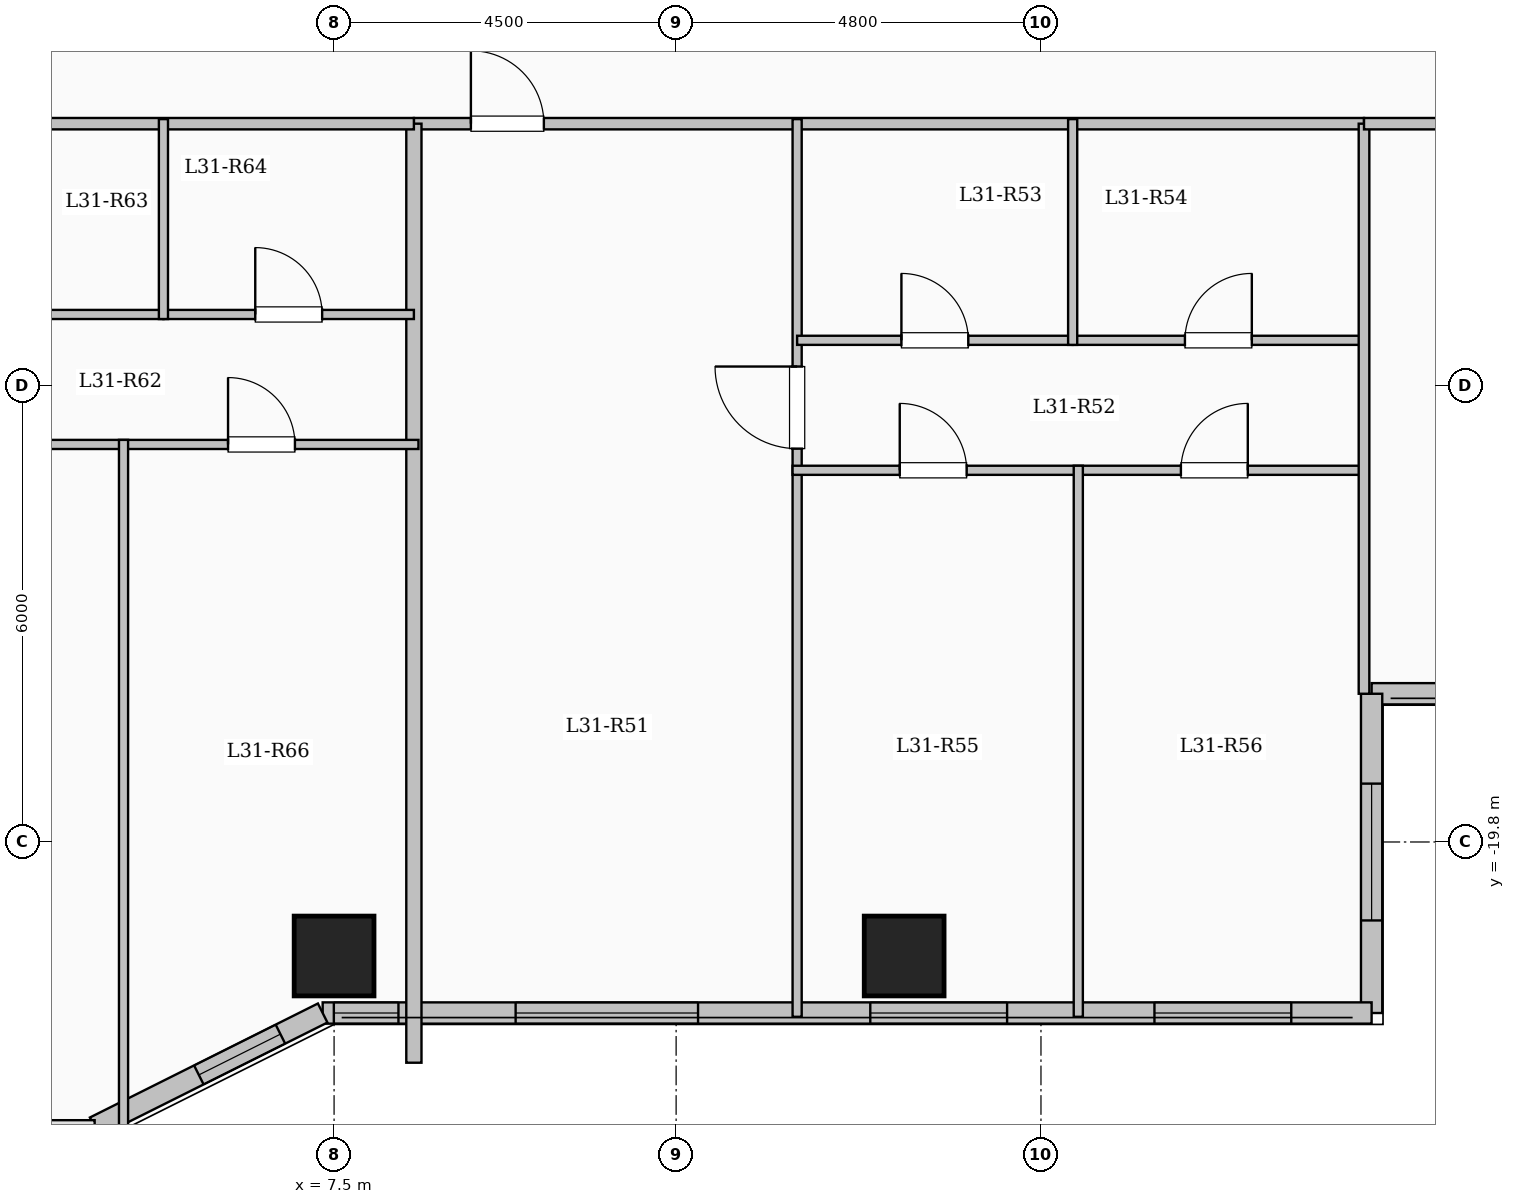
"""IFC4 building model, lengths in metres.
Left out: names, types, materials, properties, quantities, classifications, styles, units other than length and angle.
Written with IfcOpenShell. Run it as: python <this file> out.ifc"""

import sys

from ifc_helpers import new_model, si_unit, direction, frame, frame_2d, origin, origin_2d, place, context, subcontext, project, spatial, rectangle, extrude, element, fill, save


model = new_model("IFC4")
c1 = context("Model", 3, precision=1e-05, world=origin(), true_north=direction((0.0, 1.0)))
c2 = subcontext(c1, "Body", "Model", "MODEL_VIEW")
j1 = project(units=[si_unit("LENGTHUNIT", "METRE"), si_unit("PLANEANGLEUNIT", "RADIAN")], contexts=[c1])
p1 = place(None, origin())
s1 = spatial("IfcSite", under=j1, at=p1, CompositionType="ELEMENT")
p2 = place(p1, origin())
s2 = spatial("IfcBuilding", under=s1, at=p2, CompositionType="ELEMENT")
p3 = place(p2, frame((0.0, 0.0, 115.15)))
s3 = spatial("IfcBuildingStorey", under=s2, at=p3, CompositionType="ELEMENT", Elevation=115.15)
for number, where, z_axis, x_axis in (
    (1, (7.5, -21.3, 0.0), (0.0, 0.0, 1.0), (1.0, 0.0, 0.0)),
    (2, (15.0, -21.3, 0.0), (0.0, 0.0, 1.0), (1.0, 0.0, 0.0)),
):
    element("IfcColumn", number, at=place(p3, frame(where, z_axis=z_axis, x_axis=x_axis)), inside=s3, PredefinedType="COLUMN", context=c2, shape_type="SweptSolid", body=[
        extrude(rectangle(XDim=1.05, YDim=1.05, at=origin_2d()), origin(), (0.0, 0.0, 1.0), 3.35),
    ])
p4 = place(p3, frame((26.85, -17.85, 0.0), z_axis=(0.0, 0.0, 1.0), x_axis=(-1.0, 0.0, 0.0)))
e3 = element("IfcWall", 3, at=p4, inside=s3, PredefinedType="SOLIDWALL", context=c2, shape_type="SweptSolid", body=[
    extrude(rectangle(XDim=5.7, YDim=0.28, at=frame_2d((2.85, 0.0))), origin(), (0.0, 0.0, 1.0), 3.05),
])
p5 = place(p4, frame((1.675, 0.0, 0.9)))
e4 = element("IfcOpeningElement", 4, at=p5, cuts=e3, PredefinedType="OPENING", context=c2, shape_type="SweptSolid", body=[
    extrude(rectangle(XDim=2.4, YDim=1.8, at=frame_2d((1.2, 0.9))), frame((0.0, 0.15, 0.0), z_axis=(0.0, -1.0, 0.0), x_axis=(1.0, 0.0, 0.0)), (0.0, 0.0, 1.0), 0.3),
])
p6 = place(p3, frame((21.15, -17.85, 0.0), z_axis=(0.0, 0.0, 1.0), x_axis=(0.0, -1.0, 0.0)))
e5 = element("IfcWall", 5, at=p6, inside=s3, PredefinedType="SOLIDWALL", context=c2, shape_type="SweptSolid", body=[
    extrude(rectangle(XDim=4.2, YDim=0.28, at=frame_2d((2.1, 0.0))), origin(), (0.0, 0.0, 1.0), 3.05),
])
p7 = place(p6, frame((1.182, 0.0, 0.9)))
e6 = element("IfcOpeningElement", 6, at=p7, cuts=e5, PredefinedType="OPENING", context=c2, shape_type="SweptSolid", body=[
    extrude(rectangle(XDim=1.8, YDim=1.65, at=frame_2d((0.9, 0.825))), frame((0.0, 0.15, 0.0), z_axis=(0.0, -1.0, 0.0), x_axis=(1.0, 0.0, 0.0)), (0.0, 0.0, 1.0), 0.3),
])
p8 = place(p3, frame((21.15, -22.05, 0.0), z_axis=(0.0, 0.0, 1.0), x_axis=(-1.0, 0.0, 0.0)))
e7 = element("IfcWall", 7, at=p8, inside=s3, PredefinedType="SOLIDWALL", context=c2, shape_type="SweptSolid", body=[
    extrude(rectangle(XDim=13.8, YDim=0.28, at=frame_2d((6.9, 0.0))), origin(), (0.0, 0.0, 1.0), 3.05),
])
p9 = place(p8, frame((1.057, 0.0, 0.9)))
e8 = element("IfcOpeningElement", 8, at=p9, cuts=e7, PredefinedType="OPENING", context=c2, shape_type="SweptSolid", body=[
    extrude(rectangle(XDim=1.8, YDim=1.65, at=frame_2d((0.9, 0.825))), frame((0.0, 0.15, 0.0), z_axis=(0.0, -1.0, 0.0), x_axis=(1.0, 0.0, 0.0)), (0.0, 0.0, 1.0), 0.3),
])
p10 = place(p8, frame((4.796, 0.0, 0.9)))
e9 = element("IfcOpeningElement", 9, at=p10, cuts=e7, PredefinedType="OPENING", context=c2, shape_type="SweptSolid", body=[
    extrude(rectangle(XDim=1.8, YDim=1.65, at=frame_2d((0.9, 0.825))), frame((0.0, 0.15, 0.0), z_axis=(0.0, -1.0, 0.0), x_axis=(1.0, 0.0, 0.0)), (0.0, 0.0, 1.0), 0.3),
])
p11 = place(p8, frame((8.862, 0.0, 0.9)))
e10 = element("IfcOpeningElement", 10, at=p11, cuts=e7, PredefinedType="OPENING", context=c2, shape_type="SweptSolid", body=[
    extrude(rectangle(XDim=2.4, YDim=1.8, at=frame_2d((1.2, 0.9))), frame((0.0, 0.15, 0.0), z_axis=(0.0, -1.0, 0.0), x_axis=(1.0, 0.0, 0.0)), (0.0, 0.0, 1.0), 0.3),
])
p12 = place(p8, frame((12.803, 0.0, 0.95)))
e11 = element("IfcOpeningElement", 11, at=p12, cuts=e7, PredefinedType="OPENING", context=c2, shape_type="SweptSolid", body=[
    extrude(rectangle(XDim=0.85, YDim=1.5, at=frame_2d((0.425, 0.75))), frame((0.0, 0.15, 0.0), z_axis=(0.0, -1.0, 0.0), x_axis=(1.0, 0.0, 0.0)), (0.0, 0.0, 1.0), 0.3),
])
p13 = place(p3, frame((7.35, -22.05, 0.0), z_axis=(0.0, 0.0, 1.0), x_axis=(-0.894427191, -0.4472135955, 0.0)))
e12 = element("IfcWall", 12, at=p13, inside=s3, PredefinedType="SOLIDWALL", context=c2, shape_type="SweptSolid", body=[
    extrude(rectangle(XDim=3.354, YDim=0.28, at=frame_2d((1.677, 0.0))), origin(), (0.0, 0.0, 1.0), 3.05),
])
p14 = place(p13, frame((0.622, 0.0, 0.95)))
e13 = element("IfcOpeningElement", 13, at=p14, cuts=e12, PredefinedType="OPENING", context=c2, shape_type="SweptSolid", body=[
    extrude(rectangle(XDim=1.2, YDim=1.5, at=frame_2d((0.6, 0.75))), frame((0.0, 0.15, 0.0), z_axis=(0.0, -1.0, 0.0), x_axis=(1.0, 0.0, 0.0)), (0.0, 0.0, 1.0), 0.3),
])
p15 = place(p3, frame((8.55, -10.35, 0.0), z_axis=(0.0, 0.0, 1.0), x_axis=(1.0, 0.0, 0.0)))
e14 = element("IfcWall", 14, at=p15, inside=s3, PredefinedType="PARTITIONING", context=c2, shape_type="SweptSolid", body=[
    extrude(rectangle(XDim=12.5, YDim=0.15, at=frame_2d((6.25, 0.0))), origin(), (0.0, 0.0, 1.0), 3.05),
])
p16 = place(p15, frame((0.75, 0.0, 0.0)))
e15 = element("IfcOpeningElement", 15, at=p16, cuts=e14, PredefinedType="OPENING", context=c2, shape_type="SweptSolid", body=[
    extrude(rectangle(XDim=0.96, YDim=2.15, at=frame_2d((0.48, 1.075))), frame((0.0, 0.085, 0.0), z_axis=(0.0, -1.0, 0.0), x_axis=(1.0, 0.0, 0.0)), (0.0, 0.0, 1.0), 0.17),
])
p17 = place(p3, frame((13.592, -22.1, 0.0), z_axis=(0.0, 0.0, 1.0), x_axis=(0.0, 1.0, 0.0)))
e16 = element("IfcWall", 16, at=p17, inside=s3, PredefinedType="PARTITIONING", context=c2, shape_type="SweptSolid", body=[
    extrude(rectangle(XDim=11.81, YDim=0.12, at=frame_2d((5.905, 0.0))), origin(), (0.0, 0.0, 1.0), 3.05),
])
p18 = place(p17, frame((7.475, 0.0, 0.0)))
e17 = element("IfcOpeningElement", 17, at=p18, cuts=e16, PredefinedType="OPENING", context=c2, shape_type="SweptSolid", body=[
    extrude(rectangle(XDim=1.08, YDim=2.15, at=frame_2d((0.54, 1.075))), frame((0.0, 0.07, 0.0), z_axis=(0.0, -1.0, 0.0), x_axis=(1.0, 0.0, 0.0)), (0.0, 0.0, 1.0), 0.14),
])
p19 = place(p3, frame((13.592, -13.2, 0.0), z_axis=(0.0, 0.0, 1.0), x_axis=(1.0, 0.0, 0.0)))
e18 = element("IfcWall", 18, at=p19, inside=s3, PredefinedType="PARTITIONING", context=c2, shape_type="SweptSolid", body=[
    extrude(rectangle(XDim=3.625, YDim=0.12, at=frame_2d((1.812, 0.0))), origin(), (0.0, 0.0, 1.0), 3.05),
])
p20 = place(p19, frame((1.372, 0.0, 0.0)))
e19 = element("IfcOpeningElement", 19, at=p20, cuts=e18, PredefinedType="OPENING", context=c2, shape_type="SweptSolid", body=[
    extrude(rectangle(XDim=0.88, YDim=2.1, at=frame_2d((0.44, 1.05))), frame((0.0, 0.07, 0.0), z_axis=(0.0, -1.0, 0.0), x_axis=(1.0, 0.0, 0.0)), (0.0, 0.0, 1.0), 0.14),
])
p21 = place(p3, frame((17.217, -13.2, 0.0), z_axis=(0.0, 0.0, 1.0), x_axis=(1.0, 0.0, 0.0)))
e20 = element("IfcWall", 20, at=p21, inside=s3, PredefinedType="PARTITIONING", context=c2, shape_type="SweptSolid", body=[
    extrude(rectangle(XDim=3.833, YDim=0.12, at=frame_2d((1.917, 0.0))), origin(), (0.0, 0.0, 1.0), 3.05),
])
p22 = place(p21, frame((1.477, 0.0, 0.0)))
e21 = element("IfcOpeningElement", 21, at=p22, cuts=e20, PredefinedType="OPENING", context=c2, shape_type="SweptSolid", body=[
    extrude(rectangle(XDim=0.88, YDim=2.1, at=frame_2d((0.44, 1.05))), frame((0.0, 0.07, 0.0), z_axis=(0.0, -1.0, 0.0), x_axis=(1.0, 0.0, 0.0)), (0.0, 0.0, 1.0), 0.14),
])
p23 = place(p3, frame((13.532, -14.91, 0.0), z_axis=(0.0, 0.0, 1.0), x_axis=(1.0, 0.0, 0.0)))
e22 = element("IfcWall", 22, at=p23, inside=s3, PredefinedType="PARTITIONING", context=c2, shape_type="SweptSolid", body=[
    extrude(rectangle(XDim=7.578, YDim=0.12, at=frame_2d((3.789, 0.0))), origin(), (0.0, 0.0, 1.0), 3.05),
])
p24 = place(p23, frame((1.41, 0.0, 0.0)))
e23 = element("IfcOpeningElement", 23, at=p24, cuts=e22, PredefinedType="OPENING", context=c2, shape_type="SweptSolid", body=[
    extrude(rectangle(XDim=0.88, YDim=2.1, at=frame_2d((0.44, 1.05))), frame((0.0, 0.07, 0.0), z_axis=(0.0, -1.0, 0.0), x_axis=(1.0, 0.0, 0.0)), (0.0, 0.0, 1.0), 0.14),
])
p25 = place(p23, frame((5.109, 0.0, 0.0)))
e24 = element("IfcOpeningElement", 24, at=p25, cuts=e22, PredefinedType="OPENING", context=c2, shape_type="SweptSolid", body=[
    extrude(rectangle(XDim=0.88, YDim=2.1, at=frame_2d((0.44, 1.05))), frame((0.0, 0.07, 0.0), z_axis=(0.0, -1.0, 0.0), x_axis=(1.0, 0.0, 0.0)), (0.0, 0.0, 1.0), 0.14),
])
p26 = place(p3, frame((17.217, -13.26, 0.0), z_axis=(0.0, 0.0, 1.0), x_axis=(0.0, 1.0, 0.0)))
e25 = element("IfcWall", 25, at=p26, inside=s3, PredefinedType="PARTITIONING", context=c2, shape_type="SweptSolid", body=[
    extrude(rectangle(XDim=2.97, YDim=0.12, at=frame_2d((1.485, 0.0))), origin(), (0.0, 0.0, 1.0), 3.05),
])
p27 = place(p3, frame((17.291, -22.1, 0.0), z_axis=(0.0, 0.0, 1.0), x_axis=(0.0, 1.0, 0.0)))
e26 = element("IfcWall", 26, at=p27, inside=s3, PredefinedType="PARTITIONING", context=c2, shape_type="SweptSolid", body=[
    extrude(rectangle(XDim=7.25, YDim=0.12, at=frame_2d((3.625, 0.0))), origin(), (0.0, 0.0, 1.0), 3.05),
])
p28 = place(p3, frame((8.55, -22.704, 0.0), z_axis=(0.0, 0.0, 1.0), x_axis=(0.0, 1.0, 0.0)))
e27 = element("IfcWall", 27, at=p28, inside=s3, PredefinedType="SOLIDWALL", context=c2, shape_type="SweptSolid", body=[
    extrude(rectangle(XDim=12.354, YDim=0.2, at=frame_2d((6.177, 0.0))), origin(), (0.0, 0.0, 1.0), 3.05),
])
p29 = place(p3, frame((-8.55, -10.35, 0.0), z_axis=(0.0, 0.0, 1.0), x_axis=(1.0, 0.0, 0.0)))
e28 = element("IfcWall", 28, at=p29, inside=s3, PredefinedType="PARTITIONING", context=c2, shape_type="SweptSolid", body=[
    extrude(rectangle(XDim=17.1, YDim=0.15, at=frame_2d((8.55, 0.0))), origin(), (0.0, 0.0, 1.0), 3.05),
])
p30 = place(p29, frame((1.15, 0.0, 0.0)))
e29 = element("IfcOpeningElement", 29, at=p30, cuts=e28, PredefinedType="OPENING", context=c2, shape_type="SweptSolid", body=[
    extrude(rectangle(XDim=0.96, YDim=2.15, at=frame_2d((0.48, 1.075))), frame((0.0, 0.085, 0.0), z_axis=(0.0, -1.0, 0.0), x_axis=(1.0, 0.0, 0.0)), (0.0, 0.0, 1.0), 0.17),
])
p31 = place(p29, frame((10.5, 0.0, 0.0)))
e30 = element("IfcOpeningElement", 30, at=p31, cuts=e28, PredefinedType="OPENING", context=c2, shape_type="SweptSolid", body=[
    extrude(rectangle(XDim=0.96, YDim=2.15, at=frame_2d((0.48, 1.075))), frame((0.0, 0.085, 0.0), z_axis=(0.0, -1.0, 0.0), x_axis=(1.0, 0.0, 0.0)), (0.0, 0.0, 1.0), 0.17),
])
p32 = place(p3, frame((0.98, -12.86, 0.0), z_axis=(0.0, 0.0, 1.0), x_axis=(1.0, 0.0, 0.0)))
e31 = element("IfcWall", 31, at=p32, inside=s3, PredefinedType="PARTITIONING", context=c2, shape_type="SweptSolid", body=[
    extrude(rectangle(XDim=4.275, YDim=0.12, at=frame_2d((2.137, 0.0))), origin(), (0.0, 0.0, 1.0), 3.05),
])
p33 = place(p32, frame((1.698, 0.0, 0.0)))
e32 = element("IfcOpeningElement", 32, at=p33, cuts=e31, PredefinedType="OPENING", context=c2, shape_type="SweptSolid", body=[
    extrude(rectangle(XDim=0.88, YDim=2.1, at=frame_2d((0.44, 1.05))), frame((0.0, 0.07, 0.0), z_axis=(0.0, -1.0, 0.0), x_axis=(1.0, 0.0, 0.0)), (0.0, 0.0, 1.0), 0.14),
])
p34 = place(p3, frame((5.255, -12.86, 0.0), z_axis=(0.0, 0.0, 1.0), x_axis=(1.0, 0.0, 0.0)))
e33 = element("IfcWall", 33, at=p34, inside=s3, PredefinedType="PARTITIONING", context=c2, shape_type="SweptSolid", body=[
    extrude(rectangle(XDim=3.295, YDim=0.12, at=frame_2d((1.647, 0.0))), origin(), (0.0, 0.0, 1.0), 3.05),
])
p35 = place(p34, frame((1.208, 0.0, 0.0)))
e34 = element("IfcOpeningElement", 34, at=p35, cuts=e33, PredefinedType="OPENING", context=c2, shape_type="SweptSolid", body=[
    extrude(rectangle(XDim=0.88, YDim=2.1, at=frame_2d((0.44, 1.05))), frame((0.0, 0.07, 0.0), z_axis=(0.0, -1.0, 0.0), x_axis=(1.0, 0.0, 0.0)), (0.0, 0.0, 1.0), 0.14),
])
p36 = place(p3, frame((0.92, -14.57, 0.0), z_axis=(0.0, 0.0, 1.0), x_axis=(1.0, 0.0, 0.0)))
e35 = element("IfcWall", 35, at=p36, inside=s3, PredefinedType="PARTITIONING", context=c2, shape_type="SweptSolid", body=[
    extrude(rectangle(XDim=7.69, YDim=0.12, at=frame_2d((3.845, 0.0))), origin(), (0.0, 0.0, 1.0), 2.585),
])
p37 = place(p36, frame((1.435, 0.0, 0.0)))
e36 = element("IfcOpeningElement", 36, at=p37, cuts=e35, PredefinedType="OPENING", context=c2, shape_type="SweptSolid", body=[
    extrude(rectangle(XDim=0.88, YDim=2.1, at=frame_2d((0.44, 1.05))), frame((0.0, 0.07, 0.0), z_axis=(0.0, -1.0, 0.0), x_axis=(1.0, 0.0, 0.0)), (0.0, 0.0, 1.0), 0.14),
])
p38 = place(p36, frame((5.185, 0.0, 0.0)))
e37 = element("IfcOpeningElement", 37, at=p38, cuts=e35, PredefinedType="OPENING", context=c2, shape_type="SweptSolid", body=[
    extrude(rectangle(XDim=0.88, YDim=2.1, at=frame_2d((0.44, 1.05))), frame((0.0, 0.07, 0.0), z_axis=(0.0, -1.0, 0.0), x_axis=(1.0, 0.0, 0.0)), (0.0, 0.0, 1.0), 0.14),
])
p39 = place(p3, frame((5.255, -12.92, 0.0), z_axis=(0.0, 0.0, 1.0), x_axis=(0.0, 1.0, 0.0)))
e38 = element("IfcWall", 38, at=p39, inside=s3, PredefinedType="PARTITIONING", context=c2, shape_type="SweptSolid", body=[
    extrude(rectangle(XDim=2.63, YDim=0.12, at=frame_2d((1.315, 0.0))), origin(), (0.0, 0.0, 1.0), 3.05),
])
p40 = place(p3, frame((4.73, -23.58, 0.0), z_axis=(0.0, 0.0, 1.0), x_axis=(0.0, 1.0, 0.0)))
e39 = element("IfcWall", 39, at=p40, inside=s3, PredefinedType="PARTITIONING", context=c2, shape_type="SweptSolid", body=[
    extrude(rectangle(XDim=9.07, YDim=0.12, at=frame_2d((4.535, 0.0))), origin(), (0.0, 0.0, 1.0), 3.05),
])
p41 = place(p3, frame((21.05, -17.85, 0.0), z_axis=(0.0, 0.0, 1.0), x_axis=(0.0, 1.0, 0.0)))
e40 = element("IfcWall", 40, at=p41, inside=s3, PredefinedType="PARTITIONING", context=c2, shape_type="SweptSolid", body=[
    extrude(rectangle(XDim=7.5, YDim=0.14, at=frame_2d((3.75, 0.0))), origin(), (0.0, 0.0, 1.0), 3.05),
])
p42 = place(p3, frame((21.05, -10.35, 0.0), z_axis=(0.0, 0.0, 1.0), x_axis=(1.0, 0.0, 0.0)))
e41 = element("IfcWall", 41, at=p42, inside=s3, PredefinedType="PARTITIONING", context=c2, shape_type="SweptSolid", body=[
    extrude(rectangle(XDim=5.83, YDim=0.15, at=frame_2d((2.915, 0.0))), origin(), (0.0, 0.0, 1.0), 3.05),
])
p43 = place(p42, frame((2.44, 0.0, 0.0)))
e42 = element("IfcOpeningElement", 42, at=p43, cuts=e41, PredefinedType="OPENING", context=c2, shape_type="SweptSolid", body=[
    extrude(rectangle(XDim=0.95, YDim=2.15, at=frame_2d((0.475, 1.075))), frame((0.0, 0.085, 0.0), z_axis=(0.0, -1.0, 0.0), x_axis=(1.0, 0.0, 0.0)), (0.0, 0.0, 1.0), 0.17),
])
p44 = place(p7, origin())
e43 = element("IfcWindow", 43, at=p44, inside=s3, PartitioningType="SINGLE_PANEL", PredefinedType="WINDOW", context=c2, shape_type="SweptSolid", body=[
    extrude(rectangle(XDim=1.8, YDim=1.65, at=frame_2d((0.9, 0.825))), frame((0.0, 0.03, 0.0), z_axis=(0.0, -1.0, 0.0), x_axis=(1.0, 0.0, 0.0)), (0.0, 0.0, 1.0), 0.06),
])
fill(e6, e43)
p45 = place(p9, origin())
e44 = element("IfcWindow", 44, at=p45, inside=s3, PartitioningType="SINGLE_PANEL", PredefinedType="WINDOW", context=c2, shape_type="SweptSolid", body=[
    extrude(rectangle(XDim=1.8, YDim=1.65, at=frame_2d((0.9, 0.825))), frame((0.0, 0.03, 0.0), z_axis=(0.0, -1.0, 0.0), x_axis=(1.0, 0.0, 0.0)), (0.0, 0.0, 1.0), 0.06),
])
fill(e8, e44)
p46 = place(p10, origin())
e45 = element("IfcWindow", 45, at=p46, inside=s3, PartitioningType="SINGLE_PANEL", PredefinedType="WINDOW", context=c2, shape_type="SweptSolid", body=[
    extrude(rectangle(XDim=1.8, YDim=1.65, at=frame_2d((0.9, 0.825))), frame((0.0, 0.03, 0.0), z_axis=(0.0, -1.0, 0.0), x_axis=(1.0, 0.0, 0.0)), (0.0, 0.0, 1.0), 0.06),
])
fill(e9, e45)
p47 = place(p11, origin())
e46 = element("IfcWindow", 46, at=p47, inside=s3, PartitioningType="SINGLE_PANEL", PredefinedType="WINDOW", context=c2, shape_type="SweptSolid", body=[
    extrude(rectangle(XDim=2.4, YDim=1.8, at=frame_2d((1.2, 0.9))), frame((0.0, 0.03, 0.0), z_axis=(0.0, -1.0, 0.0), x_axis=(1.0, 0.0, 0.0)), (0.0, 0.0, 1.0), 0.06),
])
fill(e10, e46)
p48 = place(p12, origin())
e47 = element("IfcWindow", 47, at=p48, inside=s3, PartitioningType="SINGLE_PANEL", PredefinedType="WINDOW", context=c2, shape_type="SweptSolid", body=[
    extrude(rectangle(XDim=0.85, YDim=1.5, at=frame_2d((0.425, 0.75))), frame((0.0, 0.03, 0.0), z_axis=(0.0, -1.0, 0.0), x_axis=(1.0, 0.0, 0.0)), (0.0, 0.0, 1.0), 0.06),
])
fill(e11, e47)
p49 = place(p14, origin())
e48 = element("IfcWindow", 48, at=p49, inside=s3, PartitioningType="SINGLE_PANEL", PredefinedType="WINDOW", context=c2, shape_type="SweptSolid", body=[
    extrude(rectangle(XDim=1.2, YDim=1.5, at=frame_2d((0.6, 0.75))), frame((0.0, 0.03, 0.0), z_axis=(0.0, -1.0, 0.0), x_axis=(1.0, 0.0, 0.0)), (0.0, 0.0, 1.0), 0.06),
])
fill(e13, e48)
p50 = place(p16, origin())
e49 = element("IfcDoor", 49, at=p50, inside=s3, OperationType="SINGLE_SWING_LEFT", PredefinedType="DOOR", context=c2, shape_type="SweptSolid", body=[
    extrude(rectangle(XDim=0.96, YDim=2.15, at=frame_2d((0.48, 1.075))), frame((0.0, 0.025, 0.0), z_axis=(0.0, -1.0, 0.0), x_axis=(1.0, 0.0, 0.0)), (0.0, 0.0, 1.0), 0.05),
])
fill(e15, e49)
p51 = place(p18, origin())
e50 = element("IfcDoor", 50, at=p51, inside=s3, OperationType="SINGLE_SWING_RIGHT", PredefinedType="DOOR", context=c2, shape_type="SweptSolid", body=[
    extrude(rectangle(XDim=1.08, YDim=2.15, at=frame_2d((0.54, 1.075))), frame((0.0, 0.025, 0.0), z_axis=(0.0, -1.0, 0.0), x_axis=(1.0, 0.0, 0.0)), (0.0, 0.0, 1.0), 0.05),
])
fill(e17, e50)
p52 = place(p20, origin())
e51 = element("IfcDoor", 51, at=p52, inside=s3, OperationType="SINGLE_SWING_LEFT", PredefinedType="DOOR", context=c2, shape_type="SweptSolid", body=[
    extrude(rectangle(XDim=0.88, YDim=2.1, at=frame_2d((0.44, 1.05))), frame((0.0, 0.025, 0.0), z_axis=(0.0, -1.0, 0.0), x_axis=(1.0, 0.0, 0.0)), (0.0, 0.0, 1.0), 0.05),
])
fill(e19, e51)
p53 = place(p22, origin())
e52 = element("IfcDoor", 52, at=p53, inside=s3, OperationType="SINGLE_SWING_RIGHT", PredefinedType="DOOR", context=c2, shape_type="SweptSolid", body=[
    extrude(rectangle(XDim=0.88, YDim=2.1, at=frame_2d((0.44, 1.05))), frame((0.0, 0.025, 0.0), z_axis=(0.0, -1.0, 0.0), x_axis=(1.0, 0.0, 0.0)), (0.0, 0.0, 1.0), 0.05),
])
fill(e21, e52)
p54 = place(p24, origin())
e53 = element("IfcDoor", 53, at=p54, inside=s3, OperationType="SINGLE_SWING_LEFT", PredefinedType="DOOR", context=c2, shape_type="SweptSolid", body=[
    extrude(rectangle(XDim=0.88, YDim=2.1, at=frame_2d((0.44, 1.05))), frame((0.0, 0.025, 0.0), z_axis=(0.0, -1.0, 0.0), x_axis=(1.0, 0.0, 0.0)), (0.0, 0.0, 1.0), 0.05),
])
fill(e23, e53)
p55 = place(p25, origin())
e54 = element("IfcDoor", 54, at=p55, inside=s3, OperationType="SINGLE_SWING_RIGHT", PredefinedType="DOOR", context=c2, shape_type="SweptSolid", body=[
    extrude(rectangle(XDim=0.88, YDim=2.1, at=frame_2d((0.44, 1.05))), frame((0.0, 0.025, 0.0), z_axis=(0.0, -1.0, 0.0), x_axis=(1.0, 0.0, 0.0)), (0.0, 0.0, 1.0), 0.05),
])
fill(e24, e54)
p56 = place(p35, origin())
e55 = element("IfcDoor", 55, at=p56, inside=s3, OperationType="SINGLE_SWING_LEFT", PredefinedType="DOOR", context=c2, shape_type="SweptSolid", body=[
    extrude(rectangle(XDim=0.88, YDim=2.1, at=frame_2d((0.44, 1.05))), frame((0.0, 0.025, 0.0), z_axis=(0.0, -1.0, 0.0), x_axis=(1.0, 0.0, 0.0)), (0.0, 0.0, 1.0), 0.05),
])
fill(e34, e55)
p57 = place(p38, origin())
e56 = element("IfcDoor", 56, at=p57, inside=s3, OperationType="SINGLE_SWING_LEFT", PredefinedType="DOOR", context=c2, shape_type="SweptSolid", body=[
    extrude(rectangle(XDim=0.88, YDim=2.1, at=frame_2d((0.44, 1.05))), frame((0.0, 0.025, 0.0), z_axis=(0.0, -1.0, 0.0), x_axis=(1.0, 0.0, 0.0)), (0.0, 0.0, 1.0), 0.05),
])
fill(e37, e56)
save(model, sys.argv[1])
